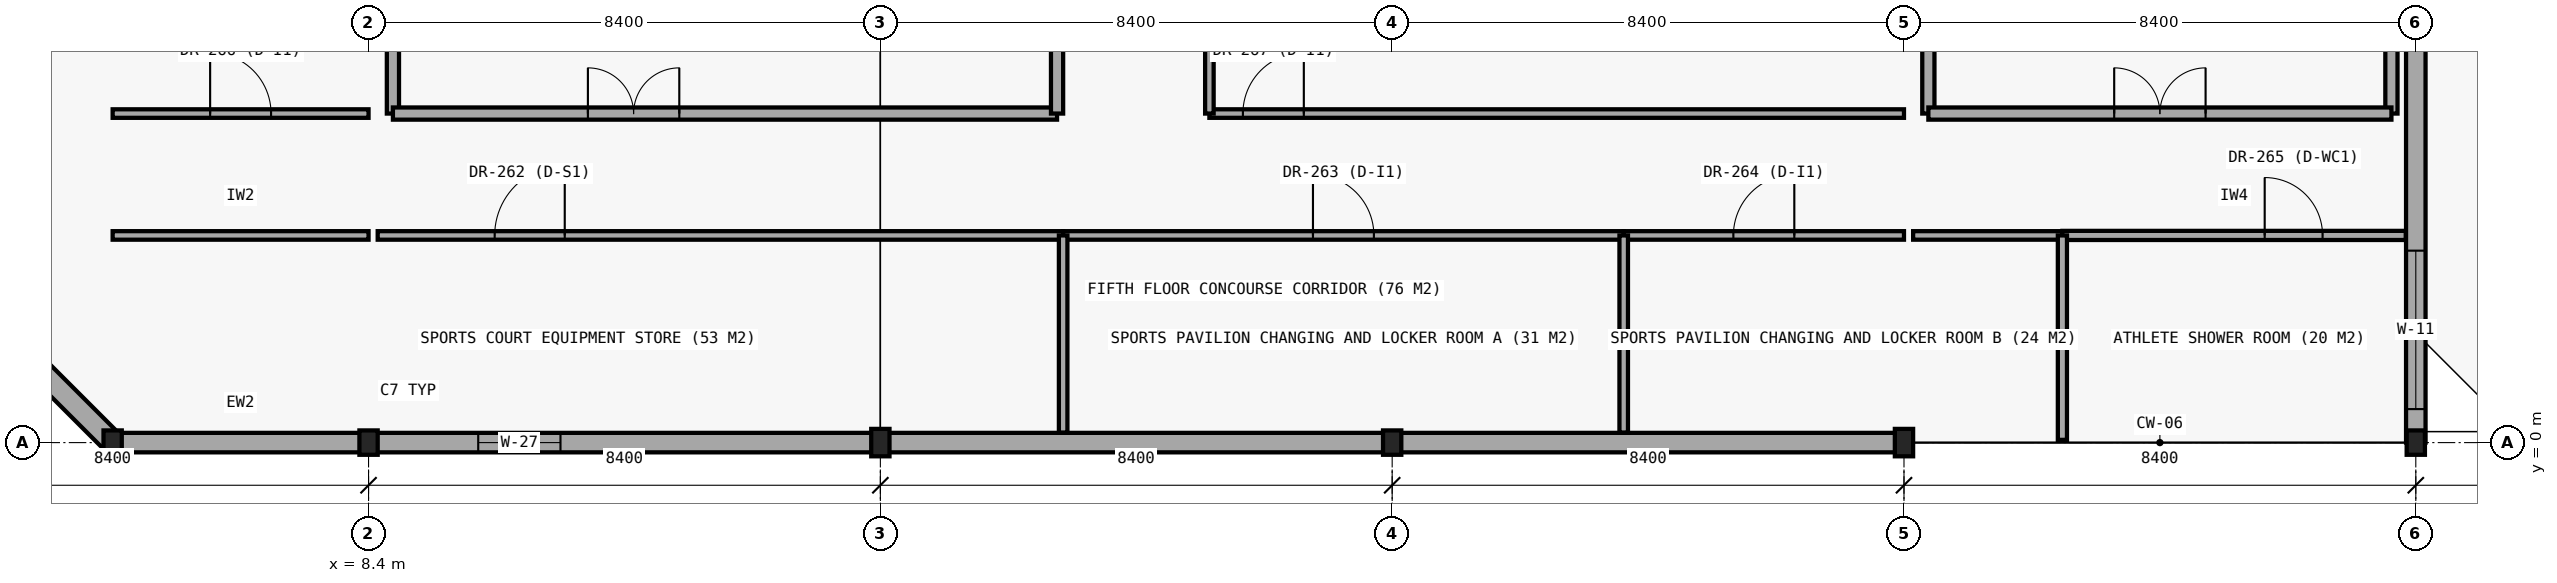
"""IFC4 building model, lengths in metres.
Left out: names, types, materials, properties, quantities, classifications, styles, units other than length and angle.
Written with IfcOpenShell. Run it as: python <this file> out.ifc"""

import sys

from ifc_helpers import new_model, si_unit, direction, frame, frame_2d, origin, origin_2d, place, context, subcontext, project, spatial, rectangle, i_section, extrude, element, fill, save


model = new_model("IFC4")
c1 = context("Model", 3, precision=1e-05, world=origin(), true_north=direction((0.0, 1.0)))
c2 = subcontext(c1, "Body", "Model", "MODEL_VIEW")
j1 = project(units=[si_unit("LENGTHUNIT", "METRE"), si_unit("PLANEANGLEUNIT", "RADIAN")], contexts=[c1])
p1 = place(None, origin())
s1 = spatial("IfcSite", under=j1, at=p1, CompositionType="ELEMENT")
p2 = place(p1, origin())
s2 = spatial("IfcBuilding", under=s1, at=p2, CompositionType="ELEMENT")
p3 = place(p2, frame((0.0, 0.0, 21.6)))
s3 = spatial("IfcBuildingStorey", under=s2, at=p3, CompositionType="ELEMENT", Elevation=21.6)
p4 = place(p3, frame((8.4, 0.0, 0.0), z_axis=(0.0, 0.0, 1.0), x_axis=(1.0, 0.0, 0.0)))
e1 = element("IfcColumn", 1, at=p4, inside=s3, PredefinedType="COLUMN", context=c2, shape_type="SweptSolid", body=[
    extrude(i_section(OverallWidth=0.3, OverallDepth=0.4, WebThickness=0.013, FlangeThickness=0.024, FilletRadius=0.027, at=origin_2d()), origin(), (0.0, 0.0, 1.0), 4.8),
])
p5 = place(p3, frame((16.8, 0.0, 0.0), z_axis=(0.0, 0.0, 1.0), x_axis=(1.0, 0.0, 0.0)))
e2 = element("IfcColumn", 2, at=p5, inside=s3, PredefinedType="COLUMN", context=c2, shape_type="SweptSolid", body=[
    extrude(i_section(OverallWidth=0.3, OverallDepth=0.45, WebThickness=0.014, FlangeThickness=0.026, FilletRadius=0.027, at=origin_2d()), origin(), (0.0, 0.0, 1.0), 4.8),
])
p6 = place(p3, frame((25.2, 0.0, 0.0), z_axis=(0.0, 0.0, 1.0), x_axis=(1.0, 0.0, 0.0)))
e3 = element("IfcColumn", 3, at=p6, inside=s3, PredefinedType="COLUMN", context=c2, shape_type="SweptSolid", body=[
    extrude(i_section(OverallWidth=0.3, OverallDepth=0.4, WebThickness=0.013, FlangeThickness=0.024, FilletRadius=0.027, at=origin_2d()), origin(), (0.0, 0.0, 1.0), 4.8),
])
p7 = place(p3, frame((33.6, 0.0, 0.0), z_axis=(0.0, 0.0, 1.0), x_axis=(1.0, 0.0, 0.0)))
e4 = element("IfcColumn", 4, at=p7, inside=s3, PredefinedType="COLUMN", context=c2, shape_type="SweptSolid", body=[
    extrude(i_section(OverallWidth=0.3, OverallDepth=0.45, WebThickness=0.014, FlangeThickness=0.026, FilletRadius=0.027, at=origin_2d()), origin(), (0.0, 0.0, 1.0), 4.8),
])
for number, where, z_axis, x_axis in (
    (5, (42.0, 0.0, 0.0), (0.0, 0.0, 1.0), (1.0, 0.0, 0.0)),
    (6, (4.2, 0.0, 0.0), (0.0, 0.0, 1.0), (1.0, 0.0, 0.0)),
):
    element("IfcColumn", number, at=place(p3, frame(where, z_axis=z_axis, x_axis=x_axis)), inside=s3, PredefinedType="COLUMN", context=c2, shape_type="SweptSolid", body=[
        extrude(i_section(OverallWidth=0.3, OverallDepth=0.4, WebThickness=0.013, FlangeThickness=0.024, FilletRadius=0.027, at=origin_2d()), origin(), (0.0, 0.0, 1.0), 4.8),
    ])
p8 = place(p3, frame((4.2, 0.0, 0.0), z_axis=(0.0, 0.0, 1.0), x_axis=(1.0, 0.0, 0.0)))
e7 = element("IfcWall", 7, at=p8, inside=s3, PredefinedType="STANDARD", context=c2, shape_type="SweptSolid", body=[
    extrude(rectangle(XDim=4.2, YDim=0.32, at=frame_2d((2.1, 0.0))), origin(), (0.0, 0.0, 1.0), 4.22),
])
p9 = place(p3, frame((8.4, 0.0, 0.0), z_axis=(0.0, 0.0, 1.0), x_axis=(1.0, 0.0, 0.0)))
e8 = element("IfcWall", 8, at=p9, inside=s3, PredefinedType="STANDARD", context=c2, shape_type="SweptSolid", body=[
    extrude(rectangle(XDim=8.4, YDim=0.32, at=frame_2d((4.2, 0.0))), origin(), (0.0, 0.0, 1.0), 4.22),
])
p10 = place(p9, frame((1.8, 0.0, 0.85)))
e9 = element("IfcOpeningElement", 9, at=p10, cuts=e8, PredefinedType="OPENING", context=c2, shape_type="SweptSolid", body=[
    extrude(rectangle(XDim=1.35, YDim=2.35, at=frame_2d((0.675, 1.175))), frame((0.0, 0.17, 0.0), z_axis=(0.0, -1.0, 0.0), x_axis=(1.0, 0.0, 0.0)), (0.0, 0.0, 1.0), 0.34),
])
p11 = place(p3, frame((16.8, 0.0, 0.0), z_axis=(0.0, 0.0, 1.0), x_axis=(1.0, 0.0, 0.0)))
e10 = element("IfcWall", 10, at=p11, inside=s3, PredefinedType="STANDARD", context=c2, shape_type="SweptSolid", body=[
    extrude(rectangle(XDim=8.4, YDim=0.32, at=frame_2d((4.2, 0.0))), origin(), (0.0, 0.0, 1.0), 4.17),
])
p12 = place(p3, frame((25.2, 0.0, 0.0), z_axis=(0.0, 0.0, 1.0), x_axis=(1.0, 0.0, 0.0)))
e11 = element("IfcWall", 11, at=p12, inside=s3, PredefinedType="STANDARD", context=c2, shape_type="SweptSolid", body=[
    extrude(rectangle(XDim=8.4, YDim=0.32, at=frame_2d((4.2, 0.0))), origin(), (0.0, 0.0, 1.0), 4.22),
])
p13 = place(p3, frame((42.0, 0.0, 0.0), z_axis=(0.0, 0.0, 1.0), x_axis=(0.0, 1.0, 0.0)))
e12 = element("IfcWall", 12, at=p13, inside=s3, PredefinedType="STANDARD", context=c2, shape_type="SweptSolid", body=[
    extrude(rectangle(XDim=8.4, YDim=0.32, at=frame_2d((4.2, 0.0))), origin(), (0.0, 0.0, 1.0), 4.22),
])
p14 = place(p13, frame((0.55, 0.0, 0.7)))
e13 = element("IfcOpeningElement", 13, at=p14, cuts=e12, PredefinedType="OPENING", context=c2, shape_type="SweptSolid", body=[
    extrude(rectangle(XDim=2.6, YDim=2.4, at=frame_2d((1.3, 1.2))), frame((0.0, 0.17, 0.0), z_axis=(0.0, -1.0, 0.0), x_axis=(1.0, 0.0, 0.0)), (0.0, 0.0, 1.0), 0.34),
])
p15 = place(p3, frame((0.0, 4.2, 0.0), z_axis=(0.0, 0.0, 1.0), x_axis=(0.707106781187, -0.707106781187, 0.0)))
e14 = element("IfcWall", 14, at=p15, inside=s3, PredefinedType="STANDARD", context=c2, shape_type="SweptSolid", body=[
    extrude(rectangle(XDim=5.94, YDim=0.36, at=frame_2d((2.97, 0.0))), origin(), (0.0, 0.0, 1.0), 4.22),
])
p16 = place(p15, frame((2.5, 0.0, 1.0)))
e15 = element("IfcOpeningElement", 15, at=p16, cuts=e14, PredefinedType="OPENING", context=c2, shape_type="SweptSolid", body=[
    extrude(rectangle(XDim=0.75, YDim=1.5, at=frame_2d((0.375, 0.75))), frame((0.0, 0.19, 0.0), z_axis=(0.0, -1.0, 0.0), x_axis=(1.0, 0.0, 0.0)), (0.0, 0.0, 1.0), 0.38),
])
p17 = place(p3, frame((8.8, 5.4, 0.0), z_axis=(0.0, 0.0, 1.0), x_axis=(0.0, 1.0, 0.0)))
e16 = element("IfcWall", 16, at=p17, inside=s3, PredefinedType="PARTITIONING", context=c2, shape_type="SweptSolid", body=[
    extrude(rectangle(XDim=2.85, YDim=0.2, at=frame_2d((1.425, 0.0))), origin(), (0.0, 0.0, 1.0), 4.12),
])
p18 = place(p3, frame((8.8, 5.4, 0.0), z_axis=(0.0, 0.0, 1.0), x_axis=(1.0, 0.0, 0.0)))
e17 = element("IfcWall", 17, at=p18, inside=s3, PredefinedType="PARTITIONING", context=c2, shape_type="SweptSolid", body=[
    extrude(rectangle(XDim=10.9, YDim=0.2, at=frame_2d((5.45, 0.0))), origin(), (0.0, 0.0, 1.0), 4.12),
])
p19 = place(p18, frame((3.2, 0.0, 0.0)))
e18 = element("IfcOpeningElement", 18, at=p19, cuts=e17, PredefinedType="OPENING", context=c2, shape_type="SweptSolid", body=[
    extrude(rectangle(XDim=1.5, YDim=2.2, at=frame_2d((0.75, 1.1))), frame((0.0, 0.11, 0.0), z_axis=(0.0, -1.0, 0.0), x_axis=(1.0, 0.0, 0.0)), (0.0, 0.0, 1.0), 0.22),
])
p20 = place(p3, frame((19.7, 5.4, 0.0), z_axis=(0.0, 0.0, 1.0), x_axis=(0.0, 1.0, 0.0)))
e19 = element("IfcWall", 19, at=p20, inside=s3, PredefinedType="PARTITIONING", context=c2, shape_type="SweptSolid", body=[
    extrude(rectangle(XDim=9.6, YDim=0.2, at=frame_2d((4.8, 0.0))), origin(), (0.0, 0.0, 1.0), 4.12),
])
p21 = place(p3, frame((34.0, 5.4, 0.0), z_axis=(0.0, 0.0, 1.0), x_axis=(0.0, 1.0, 0.0)))
e20 = element("IfcWall", 20, at=p21, inside=s3, PredefinedType="PARTITIONING", context=c2, shape_type="SweptSolid", body=[
    extrude(rectangle(XDim=2.85, YDim=0.2, at=frame_2d((1.425, 0.0))), origin(), (0.0, 0.0, 1.0), 4.0),
])
p22 = place(p3, frame((41.6, 5.4, 0.0), z_axis=(0.0, 0.0, 1.0), x_axis=(0.0, 1.0, 0.0)))
e21 = element("IfcWall", 21, at=p22, inside=s3, PredefinedType="PARTITIONING", context=c2, shape_type="SweptSolid", body=[
    extrude(rectangle(XDim=2.85, YDim=0.2, at=frame_2d((1.425, 0.0))), origin(), (0.0, 0.0, 1.0), 4.12),
])
p23 = place(p3, frame((34.0, 5.4, 0.0), z_axis=(0.0, 0.0, 1.0), x_axis=(1.0, 0.0, 0.0)))
e22 = element("IfcWall", 22, at=p23, inside=s3, PredefinedType="PARTITIONING", context=c2, shape_type="SweptSolid", body=[
    extrude(rectangle(XDim=7.6, YDim=0.2, at=frame_2d((3.8, 0.0))), origin(), (0.0, 0.0, 1.0), 4.12),
])
p24 = place(p23, frame((3.05, 0.0, 0.0)))
e23 = element("IfcOpeningElement", 23, at=p24, cuts=e22, PredefinedType="OPENING", context=c2, shape_type="SweptSolid", body=[
    extrude(rectangle(XDim=1.5, YDim=2.2, at=frame_2d((0.75, 1.1))), frame((0.0, 0.11, 0.0), z_axis=(0.0, -1.0, 0.0), x_axis=(1.0, 0.0, 0.0)), (0.0, 0.0, 1.0), 0.22),
])
p25 = place(p3, frame((4.2, 3.4, 0.0), z_axis=(0.0, 0.0, 1.0), x_axis=(1.0, 0.0, 0.0)))
e24 = element("IfcWall", 24, at=p25, inside=s3, PredefinedType="PARTITIONING", context=c2, shape_type="SweptSolid", body=[
    extrude(rectangle(XDim=4.2, YDim=0.14, at=frame_2d((2.1, 0.0))), origin(), (0.0, 0.0, 1.0), 4.1),
])
p26 = place(p3, frame((8.55, 3.4, 0.0), z_axis=(0.0, 0.0, 1.0), x_axis=(1.0, 0.0, 0.0)))
e25 = element("IfcWall", 25, at=p26, inside=s3, PredefinedType="PARTITIONING", context=c2, shape_type="SweptSolid", body=[
    extrude(rectangle(XDim=11.25, YDim=0.14, at=frame_2d((5.625, 0.0))), origin(), (0.0, 0.0, 1.0), 4.1),
])
p27 = place(p26, frame((1.92, 0.0, 0.0)))
e26 = element("IfcOpeningElement", 26, at=p27, cuts=e25, PredefinedType="OPENING", context=c2, shape_type="SweptSolid", body=[
    extrude(rectangle(XDim=1.15, YDim=2.15, at=frame_2d((0.575, 1.075))), frame((0.0, 0.08, 0.0), z_axis=(0.0, -1.0, 0.0), x_axis=(1.0, 0.0, 0.0)), (0.0, 0.0, 1.0), 0.16),
])
p28 = place(p3, frame((19.8, 3.4, 0.0), z_axis=(0.0, 0.0, 1.0), x_axis=(1.0, 0.0, 0.0)))
e27 = element("IfcWall", 27, at=p28, inside=s3, PredefinedType="PARTITIONING", context=c2, shape_type="SweptSolid", body=[
    extrude(rectangle(XDim=9.2, YDim=0.14, at=frame_2d((4.6, 0.0))), origin(), (0.0, 0.0, 1.0), 4.1),
])
p29 = place(p28, frame((4.1, 0.0, 0.0)))
e28 = element("IfcOpeningElement", 28, at=p29, cuts=e27, PredefinedType="OPENING", context=c2, shape_type="SweptSolid", body=[
    extrude(rectangle(XDim=1.0, YDim=2.15, at=frame_2d((0.5, 1.075))), frame((0.0, 0.08, 0.0), z_axis=(0.0, -1.0, 0.0), x_axis=(1.0, 0.0, 0.0)), (0.0, 0.0, 1.0), 0.16),
])
p30 = place(p3, frame((29.0, 3.4, 0.0), z_axis=(0.0, 0.0, 1.0), x_axis=(1.0, 0.0, 0.0)))
e29 = element("IfcWall", 29, at=p30, inside=s3, PredefinedType="PARTITIONING", context=c2, shape_type="SweptSolid", body=[
    extrude(rectangle(XDim=4.6, YDim=0.14, at=frame_2d((2.3, 0.0))), origin(), (0.0, 0.0, 1.0), 4.1),
])
p31 = place(p30, frame((1.8, 0.0, 0.0)))
e30 = element("IfcOpeningElement", 30, at=p31, cuts=e29, PredefinedType="OPENING", context=c2, shape_type="SweptSolid", body=[
    extrude(rectangle(XDim=1.0, YDim=2.15, at=frame_2d((0.5, 1.075))), frame((0.0, 0.08, 0.0), z_axis=(0.0, -1.0, 0.0), x_axis=(1.0, 0.0, 0.0)), (0.0, 0.0, 1.0), 0.16),
])
p32 = place(p3, frame((33.75, 3.4, 0.0), z_axis=(0.0, 0.0, 1.0), x_axis=(1.0, 0.0, 0.0)))
e31 = element("IfcWall", 31, at=p32, inside=s3, PredefinedType="PARTITIONING", context=c2, shape_type="SweptSolid", body=[
    extrude(rectangle(XDim=2.45, YDim=0.14, at=frame_2d((1.225, 0.0))), origin(), (0.0, 0.0, 1.0), 4.1),
])
p33 = place(p3, frame((36.2, 3.4, 0.0), z_axis=(0.0, 0.0, 1.0), x_axis=(1.0, 0.0, 0.0)))
e32 = element("IfcWall", 32, at=p33, inside=s3, PredefinedType="PARTITIONING", context=c2, shape_type="SweptSolid", body=[
    extrude(rectangle(XDim=5.635, YDim=0.15, at=frame_2d((2.817, 0.0))), origin(), (0.0, 0.0, 1.0), 4.1),
])
p34 = place(p33, frame((3.32, 0.0, 0.0)))
e33 = element("IfcOpeningElement", 33, at=p34, cuts=e32, PredefinedType="OPENING", context=c2, shape_type="SweptSolid", body=[
    extrude(rectangle(XDim=0.95, YDim=2.1, at=frame_2d((0.475, 1.05))), frame((0.0, 0.085, 0.0), z_axis=(0.0, -1.0, 0.0), x_axis=(1.0, 0.0, 0.0)), (0.0, 0.0, 1.0), 0.17),
])
p35 = place(p3, frame((4.2, 5.4, 0.0), z_axis=(0.0, 0.0, 1.0), x_axis=(1.0, 0.0, 0.0)))
e34 = element("IfcWall", 34, at=p35, inside=s3, PredefinedType="PARTITIONING", context=c2, shape_type="SweptSolid", body=[
    extrude(rectangle(XDim=4.2, YDim=0.14, at=frame_2d((2.1, 0.0))), origin(), (0.0, 0.0, 1.0), 4.1),
])
p36 = place(p35, frame((1.6, 0.0, 0.0)))
e35 = element("IfcOpeningElement", 35, at=p36, cuts=e34, PredefinedType="OPENING", context=c2, shape_type="SweptSolid", body=[
    extrude(rectangle(XDim=1.0, YDim=2.15, at=frame_2d((0.5, 1.075))), frame((0.0, 0.08, 0.0), z_axis=(0.0, -1.0, 0.0), x_axis=(1.0, 0.0, 0.0)), (0.0, 0.0, 1.0), 0.16),
])
p37 = place(p3, frame((22.2, 5.4, 0.0), z_axis=(0.0, 0.0, 1.0), x_axis=(1.0, 0.0, 0.0)))
e36 = element("IfcWall", 36, at=p37, inside=s3, PredefinedType="PARTITIONING", context=c2, shape_type="SweptSolid", body=[
    extrude(rectangle(XDim=11.4, YDim=0.14, at=frame_2d((5.7, 0.0))), origin(), (0.0, 0.0, 1.0), 4.1),
])
p38 = place(p37, frame((0.55, 0.0, 0.0)))
e37 = element("IfcOpeningElement", 37, at=p38, cuts=e36, PredefinedType="OPENING", context=c2, shape_type="SweptSolid", body=[
    extrude(rectangle(XDim=1.0, YDim=2.15, at=frame_2d((0.5, 1.075))), frame((0.0, 0.08, 0.0), z_axis=(0.0, -1.0, 0.0), x_axis=(1.0, 0.0, 0.0)), (0.0, 0.0, 1.0), 0.16),
])
p39 = place(p3, frame((19.8, 0.165, 0.0), z_axis=(0.0, 0.0, 1.0), x_axis=(0.0, 1.0, 0.0)))
e38 = element("IfcWall", 38, at=p39, inside=s3, PredefinedType="PARTITIONING", context=c2, shape_type="SweptSolid", body=[
    extrude(rectangle(XDim=3.235, YDim=0.14, at=frame_2d((1.617, 0.0))), origin(), (0.0, 0.0, 1.0), 4.1),
])
p40 = place(p3, frame((22.2, 5.4, 0.0), z_axis=(0.0, 0.0, 1.0), x_axis=(0.0, 1.0, 0.0)))
e39 = element("IfcWall", 39, at=p40, inside=s3, PredefinedType="PARTITIONING", context=c2, shape_type="SweptSolid", body=[
    extrude(rectangle(XDim=11.25, YDim=0.14, at=frame_2d((5.625, 0.0))), origin(), (0.0, 0.0, 1.0), 4.1),
])
p41 = place(p3, frame((29.0, 0.165, 0.0), z_axis=(0.0, 0.0, 1.0), x_axis=(0.0, 1.0, 0.0)))
e40 = element("IfcWall", 40, at=p41, inside=s3, PredefinedType="PARTITIONING", context=c2, shape_type="SweptSolid", body=[
    extrude(rectangle(XDim=3.235, YDim=0.14, at=frame_2d((1.617, 0.0))), origin(), (0.0, 0.0, 1.0), 4.1),
])
p42 = place(p3, frame((36.2, 0.045, 0.0), z_axis=(0.0, 0.0, 1.0), x_axis=(0.0, 1.0, 0.0)))
e41 = element("IfcWall", 41, at=p42, inside=s3, PredefinedType="PARTITIONING", context=c2, shape_type="SweptSolid", body=[
    extrude(rectangle(XDim=3.355, YDim=0.15, at=frame_2d((1.677, 0.0))), origin(), (0.0, 0.0, 1.0), 4.1),
])
p43 = place(p10, origin())
e42 = element("IfcWindow", 42, at=p43, inside=s3, PartitioningType="SINGLE_PANEL", PredefinedType="WINDOW", context=c2, shape_type="SweptSolid", body=[
    extrude(rectangle(XDim=1.35, YDim=2.35, at=frame_2d((0.675, 1.175))), frame((0.0, 0.03, 0.0), z_axis=(0.0, -1.0, 0.0), x_axis=(1.0, 0.0, 0.0)), (0.0, 0.0, 1.0), 0.06),
])
fill(e9, e42)
p44 = place(p14, origin())
e43 = element("IfcWindow", 43, at=p44, inside=s3, PartitioningType="SINGLE_PANEL", PredefinedType="WINDOW", context=c2, shape_type="SweptSolid", body=[
    extrude(rectangle(XDim=2.6, YDim=2.4, at=frame_2d((1.3, 1.2))), frame((0.0, 0.03, 0.0), z_axis=(0.0, -1.0, 0.0), x_axis=(1.0, 0.0, 0.0)), (0.0, 0.0, 1.0), 0.06),
])
fill(e13, e43)
p45 = place(p19, origin())
e44 = element("IfcDoor", 44, at=p45, inside=s3, OperationType="DOUBLE_DOOR_SINGLE_SWING", PredefinedType="DOOR", context=c2, shape_type="SweptSolid", body=[
    extrude(rectangle(XDim=1.5, YDim=2.2, at=frame_2d((0.75, 1.1))), frame((0.0, 0.025, 0.0), z_axis=(0.0, -1.0, 0.0), x_axis=(1.0, 0.0, 0.0)), (0.0, 0.0, 1.0), 0.05),
])
fill(e18, e44)
p46 = place(p24, origin())
e45 = element("IfcDoor", 45, at=p46, inside=s3, OperationType="DOUBLE_DOOR_SINGLE_SWING", PredefinedType="DOOR", context=c2, shape_type="SweptSolid", body=[
    extrude(rectangle(XDim=1.5, YDim=2.2, at=frame_2d((0.75, 1.1))), frame((0.0, 0.025, 0.0), z_axis=(0.0, -1.0, 0.0), x_axis=(1.0, 0.0, 0.0)), (0.0, 0.0, 1.0), 0.05),
])
fill(e23, e45)
p47 = place(p27, origin())
e46 = element("IfcDoor", 46, at=p47, inside=s3, OperationType="SINGLE_SWING_RIGHT", PredefinedType="DOOR", context=c2, shape_type="SweptSolid", body=[
    extrude(rectangle(XDim=1.15, YDim=2.15, at=frame_2d((0.575, 1.075))), frame((0.0, 0.025, 0.0), z_axis=(0.0, -1.0, 0.0), x_axis=(1.0, 0.0, 0.0)), (0.0, 0.0, 1.0), 0.05),
])
fill(e26, e46)
p48 = place(p29, origin())
e47 = element("IfcDoor", 47, at=p48, inside=s3, OperationType="SINGLE_SWING_LEFT", PredefinedType="DOOR", context=c2, shape_type="SweptSolid", body=[
    extrude(rectangle(XDim=1.0, YDim=2.15, at=frame_2d((0.5, 1.075))), frame((0.0, 0.025, 0.0), z_axis=(0.0, -1.0, 0.0), x_axis=(1.0, 0.0, 0.0)), (0.0, 0.0, 1.0), 0.05),
])
fill(e28, e47)
p49 = place(p31, origin())
e48 = element("IfcDoor", 48, at=p49, inside=s3, OperationType="SINGLE_SWING_RIGHT", PredefinedType="DOOR", context=c2, shape_type="SweptSolid", body=[
    extrude(rectangle(XDim=1.0, YDim=2.15, at=frame_2d((0.5, 1.075))), frame((0.0, 0.025, 0.0), z_axis=(0.0, -1.0, 0.0), x_axis=(1.0, 0.0, 0.0)), (0.0, 0.0, 1.0), 0.05),
])
fill(e30, e48)
p50 = place(p34, origin())
e49 = element("IfcDoor", 49, at=p50, inside=s3, OperationType="SINGLE_SWING_LEFT", PredefinedType="DOOR", context=c2, shape_type="SweptSolid", body=[
    extrude(rectangle(XDim=0.95, YDim=2.1, at=frame_2d((0.475, 1.05))), frame((0.0, 0.025, 0.0), z_axis=(0.0, -1.0, 0.0), x_axis=(1.0, 0.0, 0.0)), (0.0, 0.0, 1.0), 0.05),
])
fill(e33, e49)
p51 = place(p36, origin())
e50 = element("IfcDoor", 50, at=p51, inside=s3, OperationType="SINGLE_SWING_LEFT", PredefinedType="DOOR", context=c2, shape_type="SweptSolid", body=[
    extrude(rectangle(XDim=1.0, YDim=2.15, at=frame_2d((0.5, 1.075))), frame((0.0, 0.025, 0.0), z_axis=(0.0, -1.0, 0.0), x_axis=(1.0, 0.0, 0.0)), (0.0, 0.0, 1.0), 0.05),
])
fill(e35, e50)
p52 = place(p38, origin())
e51 = element("IfcDoor", 51, at=p52, inside=s3, OperationType="SINGLE_SWING_RIGHT", PredefinedType="DOOR", context=c2, shape_type="SweptSolid", body=[
    extrude(rectangle(XDim=1.0, YDim=2.15, at=frame_2d((0.5, 1.075))), frame((0.0, 0.025, 0.0), z_axis=(0.0, -1.0, 0.0), x_axis=(1.0, 0.0, 0.0)), (0.0, 0.0, 1.0), 0.05),
])
fill(e37, e51)
save(model, sys.argv[1])
